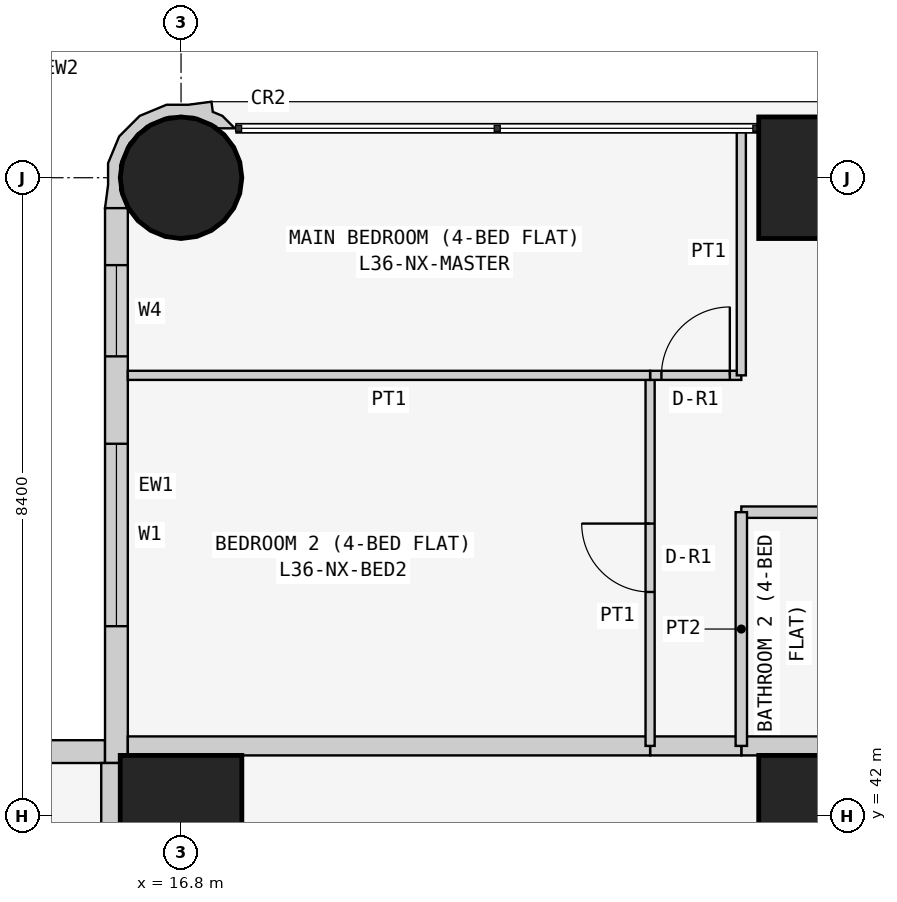
"""IFC4 building model, lengths in metres.
Left out: names, types, materials, properties, quantities, classifications, styles, units other than length and angle.
Written with IfcOpenShell. Run it as: python <this file> out.ifc"""

import sys

from ifc_helpers import new_model, si_unit, direction, frame, frame_2d, origin, origin_2d, place, context, subcontext, project, spatial, polyline, rectangle, circle, outline, extrude, element, fill, save


model = new_model("IFC4")
c1 = context("Model", 3, precision=1e-05, world=origin(), true_north=direction((0.0, 1.0)))
c2 = subcontext(c1, "Body", "Model", "MODEL_VIEW")
j1 = project(units=[si_unit("LENGTHUNIT", "METRE"), si_unit("PLANEANGLEUNIT", "RADIAN")], contexts=[c1])
p1 = place(None, origin())
s1 = spatial("IfcSite", under=j1, at=p1, CompositionType="ELEMENT")
p2 = place(p1, origin())
s2 = spatial("IfcBuilding", under=s1, at=p2, CompositionType="ELEMENT")
p3 = place(p2, frame((0.0, 0.0, 141.3)))
s3 = spatial("IfcBuildingStorey", under=s2, at=p3, CompositionType="ELEMENT", Elevation=141.3)
p4 = place(p3, frame((16.8, 42.0, 0.0), z_axis=(0.0, 0.0, 1.0), x_axis=(1.0, 0.0, 0.0)))
e1 = element("IfcColumn", 1, at=p4, inside=s3, PredefinedType="COLUMN", context=c2, shape_type="SweptSolid", body=[
    extrude(rectangle(XDim=1.6, YDim=1.6, at=origin_2d()), origin(), (0.0, 0.0, 1.0), 3.6),
])
p5 = place(p3, frame((16.8, 50.4, 0.0), z_axis=(0.0, 0.0, 1.0), x_axis=(1.0, 0.0, 0.0)))
e2 = element("IfcColumn", 2, at=p5, inside=s3, PredefinedType="COLUMN", context=c2, shape_type="SweptSolid", body=[
    extrude(circle(Radius=0.8, at=origin_2d()), origin(), (0.0, 0.0, 1.0), 3.6),
])
for number, where, z_axis, x_axis in (
    (3, (25.2, 42.0, 0.0), (0.0, 0.0, 1.0), (1.0, 0.0, 0.0)),
    (4, (25.2, 50.4, 0.0), (0.0, 0.0, 1.0), (1.0, 0.0, 0.0)),
):
    element("IfcColumn", number, at=place(p3, frame(where, z_axis=z_axis, x_axis=x_axis)), inside=s3, PredefinedType="COLUMN", context=c2, shape_type="SweptSolid", body=[
        extrude(rectangle(XDim=1.6, YDim=1.6, at=origin_2d()), origin(), (0.0, 0.0, 1.0), 3.6),
    ])
p6 = place(p3, frame((15.8, 42.85, 0.0), z_axis=(0.0, 0.0, 1.0), x_axis=(-1.0, 0.0, 0.0)))
e5 = element("IfcWall", 5, at=p6, inside=s3, PredefinedType="SOLIDWALL", context=c2, shape_type="SweptSolid", body=[
    extrude(rectangle(XDim=15.4, YDim=0.3, at=frame_2d((7.7, 0.0))), origin(), (0.0, 0.0, 1.0), 3.45),
])
p7 = place(p6, frame((1.2, 0.0, 0.9)))
e6 = element("IfcOpeningElement", 6, at=p7, cuts=e5, PredefinedType="OPENING", context=c2, shape_type="SweptSolid", body=[
    extrude(rectangle(XDim=1.8, YDim=1.5, at=frame_2d((0.9, 0.75))), frame((0.0, 0.16, 0.0), z_axis=(0.0, -1.0, 0.0), x_axis=(1.0, 0.0, 0.0)), (0.0, 0.0, 1.0), 0.32),
])
p8 = place(p6, frame((4.95, 0.0, 1.5)))
e7 = element("IfcOpeningElement", 7, at=p8, cuts=e5, PredefinedType="OPENING", context=c2, shape_type="SweptSolid", body=[
    extrude(rectangle(XDim=0.9, YDim=0.7, at=frame_2d((0.45, 0.35))), frame((0.0, 0.16, 0.0), z_axis=(0.0, -1.0, 0.0), x_axis=(1.0, 0.0, 0.0)), (0.0, 0.0, 1.0), 0.32),
])
p9 = place(p6, frame((8.5, 0.0, 0.9)))
e8 = element("IfcOpeningElement", 8, at=p9, cuts=e5, PredefinedType="OPENING", context=c2, shape_type="SweptSolid", body=[
    extrude(rectangle(XDim=1.8, YDim=1.5, at=frame_2d((0.9, 0.75))), frame((0.0, 0.16, 0.0), z_axis=(0.0, -1.0, 0.0), x_axis=(1.0, 0.0, 0.0)), (0.0, 0.0, 1.0), 0.32),
])
p10 = place(p6, frame((12.5, 0.0, 0.0)))
e9 = element("IfcOpeningElement", 9, at=p10, cuts=e5, PredefinedType="OPENING", context=c2, shape_type="SweptSolid", body=[
    extrude(rectangle(XDim=0.9, YDim=2.4, at=frame_2d((0.45, 1.2))), frame((0.0, 0.16, 0.0), z_axis=(0.0, -1.0, 0.0), x_axis=(1.0, 0.0, 0.0)), (0.0, 0.0, 1.0), 0.32),
])
p11 = place(p6, frame((13.5, 0.0, 0.9)))
e10 = element("IfcOpeningElement", 10, at=p11, cuts=e5, PredefinedType="OPENING", context=c2, shape_type="SweptSolid", body=[
    extrude(rectangle(XDim=1.2, YDim=1.5, at=frame_2d((0.6, 0.75))), frame((0.0, 0.16, 0.0), z_axis=(0.0, -1.0, 0.0), x_axis=(1.0, 0.0, 0.0)), (0.0, 0.0, 1.0), 0.32),
])
p12 = place(p3, frame((15.95, 50.0, 0.0), z_axis=(0.0, 0.0, 1.0), x_axis=(0.0, -1.0, 0.0)))
e11 = element("IfcWall", 11, at=p12, inside=s3, PredefinedType="SOLIDWALL", context=c2, shape_type="SweptSolid", body=[
    extrude(rectangle(XDim=7.3, YDim=0.3, at=frame_2d((3.65, 0.0))), origin(), (0.0, 0.0, 1.0), 3.45),
])
p13 = place(p12, frame((3.1, 0.0, 0.9)))
e12 = element("IfcOpeningElement", 12, at=p13, cuts=e11, PredefinedType="OPENING", context=c2, shape_type="SweptSolid", body=[
    extrude(rectangle(XDim=2.4, YDim=1.5, at=frame_2d((1.2, 0.75))), frame((0.0, 0.16, 0.0), z_axis=(0.0, -1.0, 0.0), x_axis=(1.0, 0.0, 0.0)), (0.0, 0.0, 1.0), 0.32),
])
p14 = place(p12, frame((0.75, 0.0, 0.9)))
e13 = element("IfcOpeningElement", 13, at=p14, cuts=e11, PredefinedType="OPENING", context=c2, shape_type="SweptSolid", body=[
    extrude(rectangle(XDim=1.2, YDim=1.5, at=frame_2d((0.6, 0.75))), frame((0.0, 0.16, 0.0), z_axis=(0.0, -1.0, 0.0), x_axis=(1.0, 0.0, 0.0)), (0.0, 0.0, 1.0), 0.32),
])
p15 = place(p3, frame((17.448, 50.995, 0.0), z_axis=(0.0, 0.0, 1.0), x_axis=(-0.343276641956, 0.93923434088, 0.0)))
e14 = element("IfcWall", 14, at=p15, inside=s3, PredefinedType="SOLIDWALL", context=c2, shape_type="SweptSolid", body=[
    extrude(outline(polyline([(0.241, 0.023), (0.333, 0.124), (0.465, 0.094), (0.532, 0.393), (0.631, 0.663), (0.614, 1.045), (0.454, 1.391), (0.172, 1.649), (-0.098, 1.748), (-0.369, 1.89), (-0.509, 1.621), (-0.491, 1.615), (-0.479, 1.609), (-0.211, 1.62), (0.088, 1.511), (0.323, 1.295), (0.457, 1.006), (0.47, 0.688), (0.361, 0.389), (0.145, 0.154), (0.108, 0.137), (0.031, -0.075), (0.241, 0.023)])), origin(), (0.0, 0.0, 1.0), 3.45),
])
p16 = place(p3, frame((24.171, 42.925, 0.0), z_axis=(0.0, 0.0, 1.0), x_axis=(1.0, 0.0, 0.0)))
e15 = element("IfcWall", 15, at=p16, inside=s3, PredefinedType="PARTITIONING", context=c2, shape_type="SweptSolid", body=[
    extrude(rectangle(XDim=2.629, YDim=0.25, at=frame_2d((1.314, 0.0))), origin(), (0.0, 0.0, 1.0), 3.45),
])
p17 = place(p3, frame((22.971, 42.925, 0.0), z_axis=(0.0, 0.0, 1.0), x_axis=(1.0, 0.0, 0.0)))
e16 = element("IfcWall", 16, at=p17, inside=s3, PredefinedType="PARTITIONING", context=c2, shape_type="SweptSolid", body=[
    extrude(rectangle(XDim=1.2, YDim=0.25, at=frame_2d((0.6, 0.0))), origin(), (0.0, 0.0, 1.0), 3.45),
])
p18 = place(p3, frame((16.1, 42.925, 0.0), z_axis=(0.0, 0.0, 1.0), x_axis=(1.0, 0.0, 0.0)))
e17 = element("IfcWall", 17, at=p18, inside=s3, PredefinedType="PARTITIONING", context=c2, shape_type="SweptSolid", body=[
    extrude(rectangle(XDim=6.871, YDim=0.25, at=frame_2d((3.436, 0.0))), origin(), (0.0, 0.0, 1.0), 3.45),
])
p19 = place(p3, frame((15.875, 36.229, 0.0), z_axis=(0.0, 0.0, 1.0), x_axis=(0.0, 1.0, 0.0)))
e18 = element("IfcWall", 18, at=p19, inside=s3, PredefinedType="PARTITIONING", context=c2, shape_type="SweptSolid", body=[
    extrude(rectangle(XDim=6.471, YDim=0.25, at=frame_2d((3.235, 0.0))), origin(), (0.0, 0.0, 1.0), 3.45),
])
p20 = place(p3, frame((26.8, 46.0, 0.0), z_axis=(0.0, 0.0, 1.0), x_axis=(-1.0, 0.0, 0.0)))
e19 = element("IfcWall", 19, at=p20, inside=s3, PredefinedType="PARTITIONING", context=c2, shape_type="SweptSolid", body=[
    extrude(rectangle(XDim=2.629, YDim=0.15, at=frame_2d((1.314, 0.0))), origin(), (0.0, 0.0, 1.0), 3.45),
])
p21 = place(p3, frame((24.171, 46.0, 0.0), z_axis=(0.0, 0.0, 1.0), x_axis=(0.0, -1.0, 0.0)))
e20 = element("IfcWall", 20, at=p21, inside=s3, PredefinedType="PARTITIONING", context=c2, shape_type="SweptSolid", body=[
    extrude(rectangle(XDim=3.075, YDim=0.15, at=frame_2d((1.538, 0.0))), origin(), (0.0, 0.0, 1.0), 3.45),
])
p22 = place(p3, frame((22.971, 42.925, 0.0), z_axis=(0.0, 0.0, 1.0), x_axis=(0.0, 1.0, 0.0)))
e21 = element("IfcWall", 21, at=p22, inside=s3, PredefinedType="PARTITIONING", context=c2, shape_type="SweptSolid", body=[
    extrude(rectangle(XDim=4.875, YDim=0.12, at=frame_2d((2.438, 0.0))), origin(), (0.0, 0.0, 1.0), 3.45),
])
p23 = place(p22, frame((2.025, 0.0, 0.0)))
e22 = element("IfcOpeningElement", 22, at=p23, cuts=e21, PredefinedType="OPENING", context=c2, shape_type="SweptSolid", body=[
    extrude(rectangle(XDim=0.9, YDim=2.1, at=frame_2d((0.45, 1.05))), frame((0.0, 0.07, 0.0), z_axis=(0.0, -1.0, 0.0), x_axis=(1.0, 0.0, 0.0)), (0.0, 0.0, 1.0), 0.14),
])
p24 = place(p3, frame((22.971, 47.8, 0.0), z_axis=(0.0, 0.0, 1.0), x_axis=(1.0, 0.0, 0.0)))
e23 = element("IfcWall", 23, at=p24, inside=s3, PredefinedType="PARTITIONING", context=c2, shape_type="SweptSolid", body=[
    extrude(rectangle(XDim=1.2, YDim=0.12, at=frame_2d((0.6, 0.0))), origin(), (0.0, 0.0, 1.0), 3.45),
])
p25 = place(p24, frame((0.149, 0.0, 0.0)))
e24 = element("IfcOpeningElement", 24, at=p25, cuts=e23, PredefinedType="OPENING", context=c2, shape_type="SweptSolid", body=[
    extrude(rectangle(XDim=0.9, YDim=2.1, at=frame_2d((0.45, 1.05))), frame((0.0, 0.07, 0.0), z_axis=(0.0, -1.0, 0.0), x_axis=(1.0, 0.0, 0.0)), (0.0, 0.0, 1.0), 0.14),
])
p26 = place(p3, frame((24.171, 47.8, 0.0), z_axis=(0.0, 0.0, 1.0), x_axis=(0.0, 1.0, 0.0)))
e25 = element("IfcWall", 25, at=p26, inside=s3, PredefinedType="PARTITIONING", context=c2, shape_type="SweptSolid", body=[
    extrude(rectangle(XDim=3.25, YDim=0.12, at=frame_2d((1.625, 0.0))), origin(), (0.0, 0.0, 1.0), 3.45),
])
p27 = place(p3, frame((22.971, 47.8, 0.0), z_axis=(0.0, 0.0, 1.0), x_axis=(-1.0, 0.0, 0.0)))
e26 = element("IfcWall", 26, at=p27, inside=s3, PredefinedType="PARTITIONING", context=c2, shape_type="SweptSolid", body=[
    extrude(rectangle(XDim=6.871, YDim=0.12, at=frame_2d((3.436, 0.0))), origin(), (0.0, 0.0, 1.0), 3.45),
])
p28 = place(p13, origin())
e27 = element("IfcWindow", 27, at=p28, inside=s3, PartitioningType="SINGLE_PANEL", PredefinedType="WINDOW", context=c2, shape_type="SweptSolid", body=[
    extrude(rectangle(XDim=2.4, YDim=1.5, at=frame_2d((1.2, 0.75))), frame((0.0, 0.03, 0.0), z_axis=(0.0, -1.0, 0.0), x_axis=(1.0, 0.0, 0.0)), (0.0, 0.0, 1.0), 0.06),
])
fill(e12, e27)
p29 = place(p14, origin())
e28 = element("IfcWindow", 28, at=p29, inside=s3, PartitioningType="SINGLE_PANEL", PredefinedType="WINDOW", context=c2, shape_type="SweptSolid", body=[
    extrude(rectangle(XDim=1.2, YDim=1.5, at=frame_2d((0.6, 0.75))), frame((0.0, 0.03, 0.0), z_axis=(0.0, -1.0, 0.0), x_axis=(1.0, 0.0, 0.0)), (0.0, 0.0, 1.0), 0.06),
])
fill(e13, e28)
p30 = place(p23, origin())
e29 = element("IfcDoor", 29, at=p30, inside=s3, OperationType="SINGLE_SWING_RIGHT", PredefinedType="DOOR", context=c2, shape_type="SweptSolid", body=[
    extrude(rectangle(XDim=0.9, YDim=2.1, at=frame_2d((0.45, 1.05))), frame((0.0, 0.025, 0.0), z_axis=(0.0, -1.0, 0.0), x_axis=(1.0, 0.0, 0.0)), (0.0, 0.0, 1.0), 0.05),
])
fill(e22, e29)
p31 = place(p25, origin())
e30 = element("IfcDoor", 30, at=p31, inside=s3, OperationType="SINGLE_SWING_RIGHT", PredefinedType="DOOR", context=c2, shape_type="SweptSolid", body=[
    extrude(rectangle(XDim=0.9, YDim=2.1, at=frame_2d((0.45, 1.05))), frame((0.0, 0.025, 0.0), z_axis=(0.0, -1.0, 0.0), x_axis=(1.0, 0.0, 0.0)), (0.0, 0.0, 1.0), 0.05),
])
fill(e24, e30)
save(model, sys.argv[1])
